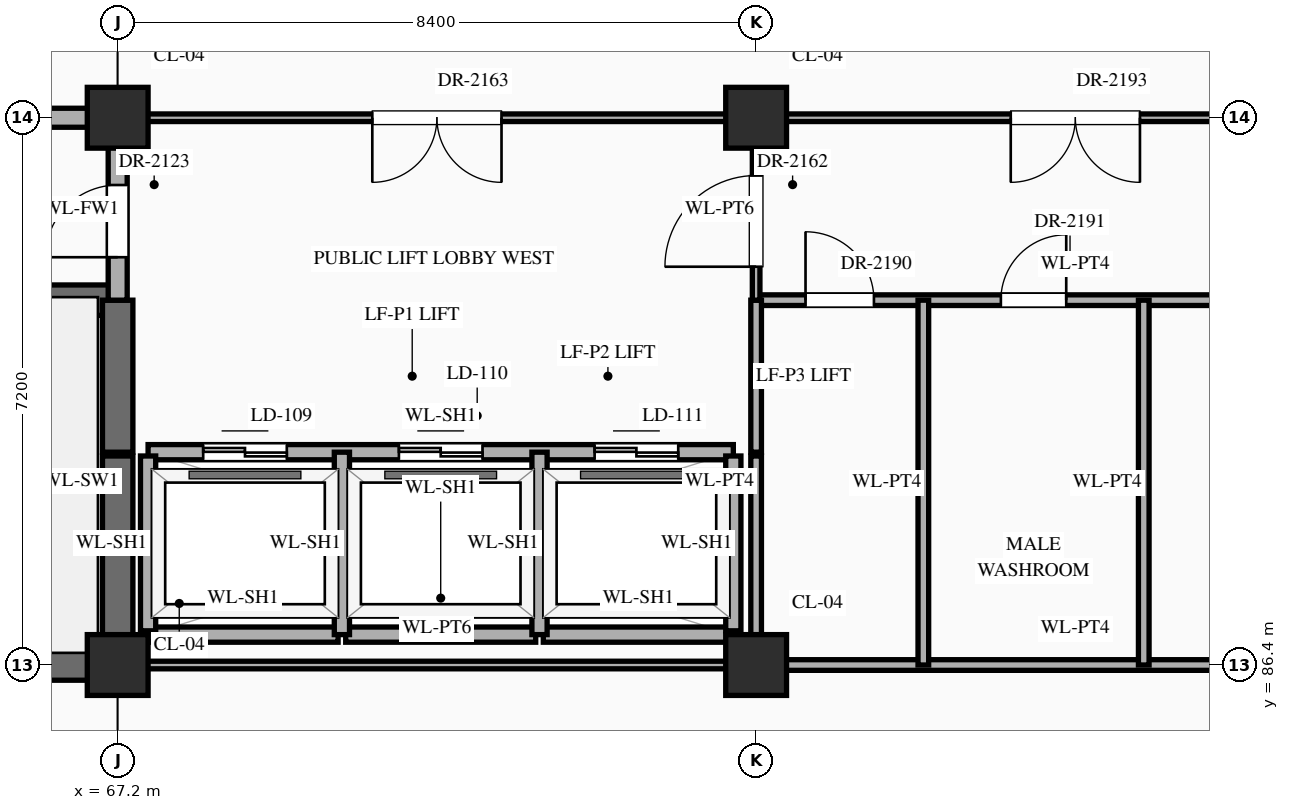
"""IFC4 building model, lengths in metres.
Left out: names, types, materials, properties, quantities, classifications, styles, units other than length and angle.
Written with IfcOpenShell. Run it as: python <this file> out.ifc"""

import sys

from ifc_helpers import new_model, si_unit, direction, frame, frame_2d, origin, origin_2d, place, context, subcontext, project, spatial, rectangle, extrude, element, fill, save


model = new_model("IFC4")
c1 = context("Model", 3, precision=1e-05, world=origin(), true_north=direction((0.0, 1.0)))
c2 = subcontext(c1, "Body", "Model", "MODEL_VIEW")
j1 = project(units=[si_unit("LENGTHUNIT", "METRE"), si_unit("PLANEANGLEUNIT", "RADIAN")], contexts=[c1])
p1 = place(None, origin())
s1 = spatial("IfcSite", under=j1, at=p1, CompositionType="ELEMENT")
p2 = place(p1, origin())
s2 = spatial("IfcBuilding", under=s1, at=p2, CompositionType="ELEMENT")
p3 = place(p2, frame((0.0, 0.0, 26.1)))
s3 = spatial("IfcBuildingStorey", under=s2, at=p3, CompositionType="ELEMENT", Elevation=26.1)
for number, where, z_axis, x_axis in (
    (1, (67.2, 86.4, 0.0), (0.0, 0.0, 1.0), (1.0, 0.0, 0.0)),
    (2, (67.2, 93.6, 0.0), (0.0, 0.0, 1.0), (1.0, 0.0, 0.0)),
    (3, (75.6, 86.4, 0.0), (0.0, 0.0, 1.0), (1.0, 0.0, 0.0)),
    (4, (75.6, 93.6, 0.0), (0.0, 0.0, 1.0), (1.0, 0.0, 0.0)),
):
    element("IfcColumn", number, at=place(p3, frame(where, z_axis=z_axis, x_axis=x_axis)), inside=s3, PredefinedType="COLUMN", context=c2, shape_type="SweptSolid", body=[
        extrude(rectangle(XDim=0.8, YDim=0.8, at=origin_2d()), origin(), (0.0, 0.0, 1.0), 4.5),
    ])
p4 = place(p3, frame((58.8, 86.4, 0.0), z_axis=(0.0, 0.0, 1.0), x_axis=(1.0, 0.0, 0.0)))
e5 = element("IfcWall", 5, at=p4, inside=s3, PredefinedType="SHEAR", context=c2, shape_type="SweptSolid", body=[
    extrude(rectangle(XDim=8.4, YDim=0.4, at=frame_2d((4.2, 0.0))), origin(), (0.0, 0.0, 1.0), 4.24),
])
p5 = place(p3, frame((67.25, 86.4, 0.0), z_axis=(0.0, 0.0, 1.0), x_axis=(1.0, 0.0, 0.0)))
e6 = element("IfcWall", 6, at=p5, inside=s3, PredefinedType="STANDARD", context=c2, shape_type="SweptSolid", body=[
    extrude(rectangle(XDim=8.3, YDim=0.1, at=frame_2d((4.15, 0.0))), origin(), (0.0, 0.0, 1.0), 3.39),
])
p6 = place(p3, frame((75.6, 86.4, 0.0), z_axis=(0.0, 0.0, 1.0), x_axis=(1.0, 0.0, 0.0)))
e7 = element("IfcWall", 7, at=p6, inside=s3, PredefinedType="STANDARD", context=c2, shape_type="SweptSolid", body=[
    extrude(rectangle(XDim=8.4, YDim=0.14, at=frame_2d((4.2, 0.0))), origin(), (0.0, 0.0, 1.0), 3.39),
])
for number, where, z_axis, x_axis in (
    (8, (67.6, 86.8, 0.0), (0.0, 0.0, 1.0), (1.0, 0.0, 0.0)),
    (9, (70.2, 86.8, 0.0), (0.0, 0.0, 1.0), (1.0, 0.0, 0.0)),
    (10, (72.8, 86.8, 0.0), (0.0, 0.0, 1.0), (1.0, 0.0, 0.0)),
):
    element("IfcWall", number, at=place(p3, frame(where, z_axis=z_axis, x_axis=x_axis)), inside=s3, PredefinedType="STANDARD", context=c2, shape_type="SweptSolid", body=[
        extrude(rectangle(XDim=2.5, YDim=0.2, at=frame_2d((1.25, 0.0))), origin(), (0.0, 0.0, 1.0), 4.24),
    ])
p7 = place(p3, frame((67.6, 89.2, 0.0), z_axis=(0.0, 0.0, 1.0), x_axis=(1.0, 0.0, 0.0)))
e11 = element("IfcWall", 11, at=p7, inside=s3, PredefinedType="STANDARD", context=c2, shape_type="SweptSolid", body=[
    extrude(rectangle(XDim=7.7, YDim=0.2, at=frame_2d((3.85, 0.0))), origin(), (0.0, 0.0, 1.0), 4.24),
])
p8 = place(p7, frame((0.725, 0.0, 0.0)))
e12 = element("IfcOpeningElement", 12, at=p8, cuts=e11, PredefinedType="OPENING", context=c2, shape_type="SweptSolid", body=[
    extrude(rectangle(XDim=1.1, YDim=2.15, at=frame_2d((0.55, 1.075))), frame((0.0, 0.112, 0.0), z_axis=(0.0, -1.0, 0.0), x_axis=(1.0, 0.0, 0.0)), (0.0, 0.0, 1.0), 0.224),
])
p9 = place(p7, frame((3.3, 0.0, 0.0)))
e13 = element("IfcOpeningElement", 13, at=p9, cuts=e11, PredefinedType="OPENING", context=c2, shape_type="SweptSolid", body=[
    extrude(rectangle(XDim=1.1, YDim=2.15, at=frame_2d((0.55, 1.075))), frame((0.0, 0.112, 0.0), z_axis=(0.0, -1.0, 0.0), x_axis=(1.0, 0.0, 0.0)), (0.0, 0.0, 1.0), 0.224),
])
p10 = place(p7, frame((5.875, 0.0, 0.0)))
e14 = element("IfcOpeningElement", 14, at=p10, cuts=e11, PredefinedType="OPENING", context=c2, shape_type="SweptSolid", body=[
    extrude(rectangle(XDim=1.1, YDim=2.15, at=frame_2d((0.55, 1.075))), frame((0.0, 0.112, 0.0), z_axis=(0.0, -1.0, 0.0), x_axis=(1.0, 0.0, 0.0)), (0.0, 0.0, 1.0), 0.224),
])
p11 = place(p3, frame((58.8, 91.2, 0.0), z_axis=(0.0, 0.0, 1.0), x_axis=(1.0, 0.0, 0.0)))
e15 = element("IfcWall", 15, at=p11, inside=s3, PredefinedType="SHEAR", context=c2, shape_type="SweptSolid", body=[
    extrude(rectangle(XDim=8.4, YDim=0.4, at=frame_2d((4.2, 0.0))), origin(), (0.0, 0.0, 1.0), 4.24),
])
p12 = place(p11, frame((0.65, 0.0, 0.0)))
e16 = element("IfcOpeningElement", 16, at=p12, cuts=e15, PredefinedType="OPENING", context=c2, shape_type="SweptSolid", body=[
    extrude(rectangle(XDim=1.1, YDim=2.2, at=frame_2d((0.55, 1.1))), frame((0.0, 0.212, 0.0), z_axis=(0.0, -1.0, 0.0), x_axis=(1.0, 0.0, 0.0)), (0.0, 0.0, 1.0), 0.424),
])
p13 = place(p3, frame((75.6, 91.2, 0.0), z_axis=(0.0, 0.0, 1.0), x_axis=(1.0, 0.0, 0.0)))
e17 = element("IfcWall", 17, at=p13, inside=s3, PredefinedType="STANDARD", context=c2, shape_type="SweptSolid", body=[
    extrude(rectangle(XDim=8.4, YDim=0.14, at=frame_2d((4.2, 0.0))), origin(), (0.0, 0.0, 1.0), 4.24),
])
p14 = place(p13, frame((0.65, 0.0, 0.0)))
e18 = element("IfcOpeningElement", 18, at=p14, cuts=e17, PredefinedType="OPENING", context=c2, shape_type="SweptSolid", body=[
    extrude(rectangle(XDim=0.9, YDim=2.15, at=frame_2d((0.45, 1.075))), frame((0.0, 0.082, 0.0), z_axis=(0.0, -1.0, 0.0), x_axis=(1.0, 0.0, 0.0)), (0.0, 0.0, 1.0), 0.164),
])
p15 = place(p13, frame((3.22, 0.0, 0.0)))
e19 = element("IfcOpeningElement", 19, at=p15, cuts=e17, PredefinedType="OPENING", context=c2, shape_type="SweptSolid", body=[
    extrude(rectangle(XDim=0.86, YDim=2.1, at=frame_2d((0.43, 1.05))), frame((0.0, 0.082, 0.0), z_axis=(0.0, -1.0, 0.0), x_axis=(1.0, 0.0, 0.0)), (0.0, 0.0, 1.0), 0.164),
])
p16 = place(p13, frame((6.32, 0.0, 0.0)))
e20 = element("IfcOpeningElement", 20, at=p16, cuts=e17, PredefinedType="OPENING", context=c2, shape_type="SweptSolid", body=[
    extrude(rectangle(XDim=0.86, YDim=2.1, at=frame_2d((0.43, 1.05))), frame((0.0, 0.082, 0.0), z_axis=(0.0, -1.0, 0.0), x_axis=(1.0, 0.0, 0.0)), (0.0, 0.0, 1.0), 0.164),
])
p17 = place(p3, frame((58.8, 93.6, 0.0), z_axis=(0.0, 0.0, 1.0), x_axis=(1.0, 0.0, 0.0)))
e21 = element("IfcWall", 21, at=p17, inside=s3, PredefinedType="STANDARD", context=c2, shape_type="SweptSolid", body=[
    extrude(rectangle(XDim=8.4, YDim=0.25, at=frame_2d((4.2, 0.0))), origin(), (0.0, 0.0, 1.0), 3.39),
])
p18 = place(p17, frame((3.45, 0.0, 0.0)))
e22 = element("IfcOpeningElement", 22, at=p18, cuts=e21, PredefinedType="OPENING", context=c2, shape_type="SweptSolid", body=[
    extrude(rectangle(XDim=1.5, YDim=2.25, at=frame_2d((0.75, 1.125))), frame((0.0, 0.137, 0.0), z_axis=(0.0, -1.0, 0.0), x_axis=(1.0, 0.0, 0.0)), (0.0, 0.0, 1.0), 0.274),
])
p19 = place(p3, frame((67.2, 93.6, 0.0), z_axis=(0.0, 0.0, 1.0), x_axis=(1.0, 0.0, 0.0)))
e23 = element("IfcWall", 23, at=p19, inside=s3, PredefinedType="STANDARD", context=c2, shape_type="SweptSolid", body=[
    extrude(rectangle(XDim=33.6, YDim=0.1, at=frame_2d((16.8, 0.0))), origin(), (0.0, 0.0, 1.0), 3.39),
])
p20 = place(p19, frame((3.35, 0.0, 0.0)))
e24 = element("IfcOpeningElement", 24, at=p20, cuts=e23, PredefinedType="OPENING", context=c2, shape_type="SweptSolid", body=[
    extrude(rectangle(XDim=1.7, YDim=2.45, at=frame_2d((0.85, 1.225))), frame((0.0, 0.062, 0.0), z_axis=(0.0, -1.0, 0.0), x_axis=(1.0, 0.0, 0.0)), (0.0, 0.0, 1.0), 0.124),
])
p21 = place(p19, frame((28.675, 0.0, 0.0)))
e25 = element("IfcOpeningElement", 25, at=p21, cuts=e23, PredefinedType="OPENING", context=c2, shape_type="SweptSolid", body=[
    extrude(rectangle(XDim=1.45, YDim=2.3, at=frame_2d((0.725, 1.15))), frame((0.0, 0.062, 0.0), z_axis=(0.0, -1.0, 0.0), x_axis=(1.0, 0.0, 0.0)), (0.0, 0.0, 1.0), 0.124),
])
p22 = place(p19, frame((11.75, 0.0, 0.0)))
e26 = element("IfcOpeningElement", 26, at=p22, cuts=e23, PredefinedType="OPENING", context=c2, shape_type="SweptSolid", body=[
    extrude(rectangle(XDim=1.7, YDim=2.45, at=frame_2d((0.85, 1.225))), frame((0.0, 0.062, 0.0), z_axis=(0.0, -1.0, 0.0), x_axis=(1.0, 0.0, 0.0)), (0.0, 0.0, 1.0), 0.124),
])
p23 = place(p19, frame((17.88, 0.0, 0.0)))
e27 = element("IfcOpeningElement", 27, at=p23, cuts=e23, PredefinedType="OPENING", context=c2, shape_type="SweptSolid", body=[
    extrude(rectangle(XDim=0.96, YDim=2.2, at=frame_2d((0.48, 1.1))), frame((0.0, 0.062, 0.0), z_axis=(0.0, -1.0, 0.0), x_axis=(1.0, 0.0, 0.0)), (0.0, 0.0, 1.0), 0.124),
])
p24 = place(p19, frame((20.5, 0.0, 0.0)))
e28 = element("IfcOpeningElement", 28, at=p24, cuts=e23, PredefinedType="OPENING", context=c2, shape_type="SweptSolid", body=[
    extrude(rectangle(XDim=1.0, YDim=2.25, at=frame_2d((0.5, 1.125))), frame((0.0, 0.062, 0.0), z_axis=(0.0, -1.0, 0.0), x_axis=(1.0, 0.0, 0.0)), (0.0, 0.0, 1.0), 0.124),
])
p25 = place(p19, frame((23.12, 0.0, 0.0)))
e29 = element("IfcOpeningElement", 29, at=p25, cuts=e23, PredefinedType="OPENING", context=c2, shape_type="SweptSolid", body=[
    extrude(rectangle(XDim=1.04, YDim=2.2, at=frame_2d((0.52, 1.1))), frame((0.0, 0.062, 0.0), z_axis=(0.0, -1.0, 0.0), x_axis=(1.0, 0.0, 0.0)), (0.0, 0.0, 1.0), 0.124),
])
p26 = place(p3, frame((67.2, 86.45, 0.0), z_axis=(0.0, 0.0, 1.0), x_axis=(0.0, 1.0, 0.0)))
e30 = element("IfcWall", 30, at=p26, inside=s3, PredefinedType="SHEAR", context=c2, shape_type="SweptSolid", body=[
    extrude(rectangle(XDim=2.7, YDim=0.4, at=frame_2d((1.35, 0.0))), origin(), (0.0, 0.0, 1.0), 4.24),
])
p27 = place(p3, frame((67.2, 89.2, 0.0), z_axis=(0.0, 0.0, 1.0), x_axis=(0.0, 1.0, 0.0)))
e31 = element("IfcWall", 31, at=p27, inside=s3, PredefinedType="SHEAR", context=c2, shape_type="SweptSolid", body=[
    extrude(rectangle(XDim=2.0, YDim=0.4, at=frame_2d((1.0, 0.0))), origin(), (0.0, 0.0, 1.0), 4.24),
])
p28 = place(p3, frame((67.2, 91.2, 0.0), z_axis=(0.0, 0.0, 1.0), x_axis=(0.0, 1.0, 0.0)))
e32 = element("IfcWall", 32, at=p28, inside=s3, PredefinedType="STANDARD", context=c2, shape_type="SweptSolid", body=[
    extrude(rectangle(XDim=2.4, YDim=0.25, at=frame_2d((1.2, 0.0))), origin(), (0.0, 0.0, 1.0), 3.49),
])
p29 = place(p28, frame((0.565, 0.0, 0.0)))
e33 = element("IfcOpeningElement", 33, at=p29, cuts=e32, PredefinedType="OPENING", context=c2, shape_type="SweptSolid", body=[
    extrude(rectangle(XDim=0.95, YDim=2.15, at=frame_2d((0.475, 1.075))), frame((0.0, 0.137, 0.0), z_axis=(0.0, -1.0, 0.0), x_axis=(1.0, 0.0, 0.0)), (0.0, 0.0, 1.0), 0.274),
])
p30 = place(p3, frame((67.6, 86.85, 0.0), z_axis=(0.0, 0.0, 1.0), x_axis=(0.0, 1.0, 0.0)))
e34 = element("IfcWall", 34, at=p30, inside=s3, PredefinedType="STANDARD", context=c2, shape_type="SweptSolid", body=[
    extrude(rectangle(XDim=2.3, YDim=0.2, at=frame_2d((1.15, 0.0))), origin(), (0.0, 0.0, 1.0), 4.24),
])
for number, where, z_axis, x_axis in (
    (35, (70.15, 86.8, 0.0), (0.0, 0.0, 1.0), (0.0, 1.0, 0.0)),
    (36, (72.75, 86.8, 0.0), (0.0, 0.0, 1.0), (0.0, 1.0, 0.0)),
):
    element("IfcWall", number, at=place(p3, frame(where, z_axis=z_axis, x_axis=x_axis)), inside=s3, PredefinedType="STANDARD", context=c2, shape_type="SweptSolid", body=[
        extrude(rectangle(XDim=2.4, YDim=0.2, at=frame_2d((1.2, 0.0))), origin(), (0.0, 0.0, 1.0), 4.24),
    ])
p31 = place(p3, frame((75.3, 86.85, 0.0), z_axis=(0.0, 0.0, 1.0), x_axis=(0.0, 1.0, 0.0)))
e37 = element("IfcWall", 37, at=p31, inside=s3, PredefinedType="STANDARD", context=c2, shape_type="SweptSolid", body=[
    extrude(rectangle(XDim=2.3, YDim=0.2, at=frame_2d((1.15, 0.0))), origin(), (0.0, 0.0, 1.0), 4.24),
])
p32 = place(p3, frame((75.6, 86.45, 0.0), z_axis=(0.0, 0.0, 1.0), x_axis=(0.0, 1.0, 0.0)))
e38 = element("IfcWall", 38, at=p32, inside=s3, PredefinedType="STANDARD", context=c2, shape_type="SweptSolid", body=[
    extrude(rectangle(XDim=2.7, YDim=0.14, at=frame_2d((1.35, 0.0))), origin(), (0.0, 0.0, 1.0), 3.49),
])
p33 = place(p3, frame((75.6, 89.2, 0.0), z_axis=(0.0, 0.0, 1.0), x_axis=(0.0, 1.0, 0.0)))
e39 = element("IfcWall", 39, at=p33, inside=s3, PredefinedType="STANDARD", context=c2, shape_type="SweptSolid", body=[
    extrude(rectangle(XDim=2.0, YDim=0.14, at=frame_2d((1.0, 0.0))), origin(), (0.0, 0.0, 1.0), 3.49),
])
p34 = place(p3, frame((75.6, 91.2, 0.0), z_axis=(0.0, 0.0, 1.0), x_axis=(0.0, 1.0, 0.0)))
e40 = element("IfcWall", 40, at=p34, inside=s3, PredefinedType="STANDARD", context=c2, shape_type="SweptSolid", body=[
    extrude(rectangle(XDim=2.4, YDim=0.1, at=frame_2d((1.2, 0.0))), origin(), (0.0, 0.0, 1.0), 3.49),
])
p35 = place(p34, frame((0.44, 0.0, 0.0)))
e41 = element("IfcOpeningElement", 41, at=p35, cuts=e40, PredefinedType="OPENING", context=c2, shape_type="SweptSolid", body=[
    extrude(rectangle(XDim=1.2, YDim=2.35, at=frame_2d((0.6, 1.175))), frame((0.0, 0.062, 0.0), z_axis=(0.0, -1.0, 0.0), x_axis=(1.0, 0.0, 0.0)), (0.0, 0.0, 1.0), 0.124),
])
for number, where, z_axis, x_axis in (
    (42, (77.8, 86.4, 0.0), (0.0, 0.0, 1.0), (0.0, 1.0, 0.0)),
    (43, (80.7, 86.4, 0.0), (0.0, 0.0, 1.0), (0.0, 1.0, 0.0)),
):
    element("IfcWall", number, at=place(p3, frame(where, z_axis=z_axis, x_axis=x_axis)), inside=s3, PredefinedType="STANDARD", context=c2, shape_type="SweptSolid", body=[
        extrude(rectangle(XDim=4.8, YDim=0.14, at=frame_2d((2.4, 0.0))), origin(), (0.0, 0.0, 1.0), 4.24),
    ])
p36 = place(p8, origin())
e44 = element("IfcDoor", 44, at=p36, inside=s3, OperationType="DOUBLE_DOOR_SLIDING", PredefinedType="DOOR", context=c2, shape_type="SweptSolid", body=[
    extrude(rectangle(XDim=1.1, YDim=2.15, at=frame_2d((0.55, 1.075))), frame((0.0, 0.025, 0.0), z_axis=(0.0, -1.0, 0.0), x_axis=(1.0, 0.0, 0.0)), (0.0, 0.0, 1.0), 0.05),
])
fill(e12, e44)
p37 = place(p9, origin())
e45 = element("IfcDoor", 45, at=p37, inside=s3, OperationType="DOUBLE_DOOR_SLIDING", PredefinedType="DOOR", context=c2, shape_type="SweptSolid", body=[
    extrude(rectangle(XDim=1.1, YDim=2.15, at=frame_2d((0.55, 1.075))), frame((0.0, 0.025, 0.0), z_axis=(0.0, -1.0, 0.0), x_axis=(1.0, 0.0, 0.0)), (0.0, 0.0, 1.0), 0.05),
])
fill(e13, e45)
p38 = place(p10, origin())
e46 = element("IfcDoor", 46, at=p38, inside=s3, OperationType="DOUBLE_DOOR_SLIDING", PredefinedType="DOOR", context=c2, shape_type="SweptSolid", body=[
    extrude(rectangle(XDim=1.1, YDim=2.15, at=frame_2d((0.55, 1.075))), frame((0.0, 0.025, 0.0), z_axis=(0.0, -1.0, 0.0), x_axis=(1.0, 0.0, 0.0)), (0.0, 0.0, 1.0), 0.05),
])
fill(e14, e46)
p39 = place(p29, origin())
e47 = element("IfcDoor", 47, at=p39, inside=s3, OperationType="SINGLE_SWING_LEFT", PredefinedType="DOOR", context=c2, shape_type="SweptSolid", body=[
    extrude(rectangle(XDim=0.95, YDim=2.15, at=frame_2d((0.475, 1.075))), frame((0.0, 0.025, 0.0), z_axis=(0.0, -1.0, 0.0), x_axis=(1.0, 0.0, 0.0)), (0.0, 0.0, 1.0), 0.05),
])
fill(e33, e47)
p40 = place(p35, origin())
e48 = element("IfcDoor", 48, at=p40, inside=s3, OperationType="SINGLE_SWING_LEFT", PredefinedType="DOOR", context=c2, shape_type="SweptSolid", body=[
    extrude(rectangle(XDim=1.2, YDim=2.35, at=frame_2d((0.6, 1.175))), frame((0.0, 0.025, 0.0), z_axis=(0.0, -1.0, 0.0), x_axis=(1.0, 0.0, 0.0)), (0.0, 0.0, 1.0), 0.05),
])
fill(e41, e48)
p41 = place(p20, frame((1.7, 0.0, 0.0), z_axis=(0.0, 0.0, 1.0), x_axis=(-1.0, 0.0, 0.0)))
e49 = element("IfcDoor", 49, at=p41, inside=s3, OperationType="DOUBLE_DOOR_SINGLE_SWING", PredefinedType="DOOR", context=c2, shape_type="SweptSolid", body=[
    extrude(rectangle(XDim=1.7, YDim=2.45, at=frame_2d((0.85, 1.225))), frame((0.0, 0.025, 0.0), z_axis=(0.0, -1.0, 0.0), x_axis=(1.0, 0.0, 0.0)), (0.0, 0.0, 1.0), 0.05),
])
fill(e24, e49)
p42 = place(p14, origin())
e50 = element("IfcDoor", 50, at=p42, inside=s3, OperationType="SINGLE_SWING_LEFT", PredefinedType="DOOR", context=c2, shape_type="SweptSolid", body=[
    extrude(rectangle(XDim=0.9, YDim=2.15, at=frame_2d((0.45, 1.075))), frame((0.0, 0.025, 0.0), z_axis=(0.0, -1.0, 0.0), x_axis=(1.0, 0.0, 0.0)), (0.0, 0.0, 1.0), 0.05),
])
fill(e18, e50)
p43 = place(p15, origin())
e51 = element("IfcDoor", 51, at=p43, inside=s3, OperationType="SINGLE_SWING_RIGHT", PredefinedType="DOOR", context=c2, shape_type="SweptSolid", body=[
    extrude(rectangle(XDim=0.86, YDim=2.1, at=frame_2d((0.43, 1.05))), frame((0.0, 0.025, 0.0), z_axis=(0.0, -1.0, 0.0), x_axis=(1.0, 0.0, 0.0)), (0.0, 0.0, 1.0), 0.05),
])
fill(e19, e51)
p44 = place(p22, frame((1.7, 0.0, 0.0), z_axis=(0.0, 0.0, 1.0), x_axis=(-1.0, 0.0, 0.0)))
e52 = element("IfcDoor", 52, at=p44, inside=s3, OperationType="DOUBLE_DOOR_SINGLE_SWING", PredefinedType="DOOR", context=c2, shape_type="SweptSolid", body=[
    extrude(rectangle(XDim=1.7, YDim=2.45, at=frame_2d((0.85, 1.225))), frame((0.0, 0.025, 0.0), z_axis=(0.0, -1.0, 0.0), x_axis=(1.0, 0.0, 0.0)), (0.0, 0.0, 1.0), 0.05),
])
fill(e26, e52)
save(model, sys.argv[1])
